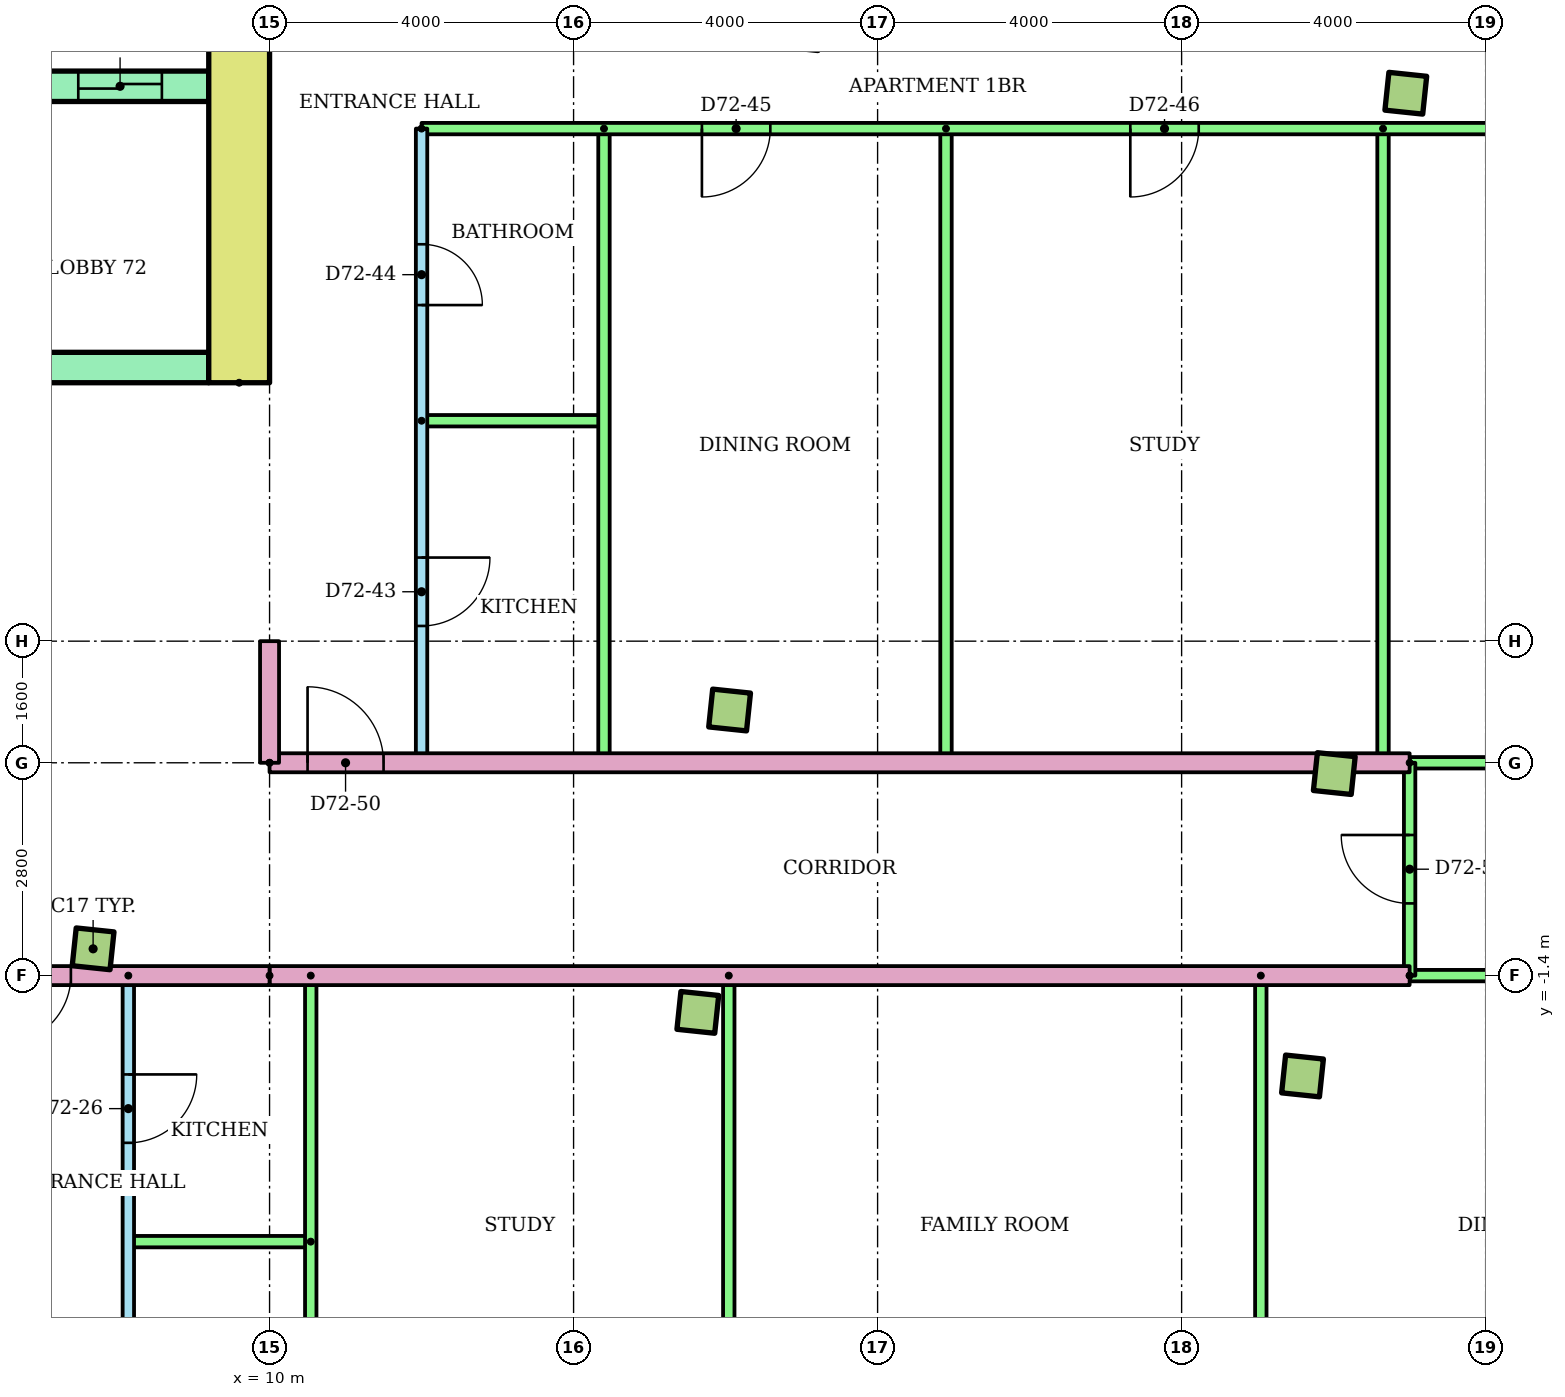
"""IFC4 building model, lengths in metres.
Left out: names, types, materials, properties, quantities, classifications, styles, units other than length and angle.
Written with IfcOpenShell. Run it as: python <this file> out.ifc"""

import sys

from ifc_helpers import new_model, si_unit, direction, frame, frame_2d, origin, origin_2d, place, context, subcontext, project, spatial, rectangle, extrude, element, fill, save


model = new_model("IFC4")
c1 = context("Model", 3, precision=1e-05, world=origin(), true_north=direction((0.0, 1.0)))
c2 = subcontext(c1, "Body", "Model", "MODEL_VIEW")
j1 = project(units=[si_unit("LENGTHUNIT", "METRE"), si_unit("PLANEANGLEUNIT", "RADIAN")], contexts=[c1])
p1 = place(None, origin())
s1 = spatial("IfcSite", under=j1, at=p1, CompositionType="ELEMENT")
p2 = place(p1, origin())
s2 = spatial("IfcBuilding", under=s1, at=p2, CompositionType="ELEMENT")
p3 = place(p2, frame((0.0, 0.0, 275.5)))
s3 = spatial("IfcBuildingStorey", under=s2, at=p3, CompositionType="ELEMENT", Elevation=275.5)
for number, where, z_axis, x_axis in (
    (1, (7.678, -1.048, 0.0), (0.0, 0.0, 1.0), (0.995, -0.105, 0.0)),
    (2, (15.635, -1.884, 0.0), (0.0, 0.0, 1.0), (0.995, -0.105, 0.0)),
    (3, (23.591, -2.72, 0.0), (0.0, 0.0, 1.0), (0.995, -0.105, 0.0)),
    (4, (16.053, 2.094, 0.0), (0.0, 0.0, 1.0), (0.995, -0.105, 0.0)),
    (5, (24.009, 1.258, 0.0), (0.0, 0.0, 1.0), (0.995, -0.105, 0.0)),
    (6, (24.95, 10.209, 0.0), (0.0, 0.0, 1.0), (0.995, -0.105, 0.0)),
):
    element("IfcColumn", number, at=place(p3, frame(where, z_axis=z_axis, x_axis=x_axis)), inside=s3, PredefinedType="COLUMN", context=c2, shape_type="SweptSolid", body=[
        extrude(rectangle(XDim=0.5, YDim=0.5, at=origin_2d()), origin(), (0.0, 0.0, 1.0), 3.2),
    ])
p4 = place(p3, frame((9.6, 6.4, 0.0), z_axis=(0.0, 0.0, 1.0), x_axis=(0.0, 1.0, 0.0)))
e7 = element("IfcWall", 7, at=p4, inside=s3, PredefinedType="SHEAR", context=c2, shape_type="SweptSolid", body=[
    extrude(rectangle(XDim=13.6, YDim=0.8, at=frame_2d((6.8, 0.0))), origin(), (0.0, 0.0, 1.0), 2.92),
])
p5 = place(p3, frame((-9.2, 6.6, 0.0)))
e8 = element("IfcWall", 8, at=p5, inside=s3, PredefinedType="SHEAR", context=c2, shape_type="SweptSolid", body=[
    extrude(rectangle(XDim=18.4, YDim=0.4, at=frame_2d((9.2, 0.0))), origin(), (0.0, 0.0, 1.0), 2.92),
])
p6 = place(p5, frame((8.3, 0.0, 0.0)))
e9 = element("IfcOpeningElement", 9, at=p6, cuts=e8, PredefinedType="OPENING", context=c2, shape_type="SweptSolid", body=[
    extrude(rectangle(XDim=1.8, YDim=2.1, at=frame_2d((0.9, 1.05))), frame((0.0, 0.21, 0.0), z_axis=(0.0, -1.0, 0.0), x_axis=(1.0, 0.0, 0.0)), (0.0, 0.0, 1.0), 0.42),
])
p7 = place(p5, frame((3.8, 0.0, 0.0)))
e10 = element("IfcOpeningElement", 10, at=p7, cuts=e8, PredefinedType="OPENING", context=c2, shape_type="SweptSolid", body=[
    extrude(rectangle(XDim=1.8, YDim=2.1, at=frame_2d((0.9, 1.05))), frame((0.0, 0.21, 0.0), z_axis=(0.0, -1.0, 0.0), x_axis=(1.0, 0.0, 0.0)), (0.0, 0.0, 1.0), 0.42),
])
p8 = place(p5, frame((12.8, 0.0, 0.0)))
e11 = element("IfcOpeningElement", 11, at=p8, cuts=e8, PredefinedType="OPENING", context=c2, shape_type="SweptSolid", body=[
    extrude(rectangle(XDim=1.8, YDim=2.1, at=frame_2d((0.9, 1.05))), frame((0.0, 0.21, 0.0), z_axis=(0.0, -1.0, 0.0), x_axis=(1.0, 0.0, 0.0)), (0.0, 0.0, 1.0), 0.42),
])
p9 = place(p3, frame((1.2, 10.3, 0.0)))
e12 = element("IfcWall", 12, at=p9, inside=s3, PredefinedType="SHEAR", context=c2, shape_type="SweptSolid", body=[
    extrude(rectangle(XDim=8.0, YDim=0.4, at=frame_2d((4.0, 0.0))), origin(), (0.0, 0.0, 1.0), 2.92),
])
p10 = place(p9, frame((0.817, 0.0, 0.0)))
e13 = element("IfcOpeningElement", 13, at=p10, cuts=e12, PredefinedType="OPENING", context=c2, shape_type="SweptSolid", body=[
    extrude(rectangle(XDim=1.1, YDim=2.1, at=frame_2d((0.55, 1.05))), frame((0.0, 0.21, 0.0), z_axis=(0.0, -1.0, 0.0), x_axis=(1.0, 0.0, 0.0)), (0.0, 0.0, 1.0), 0.42),
])
p11 = place(p9, frame((3.55, 0.0, 0.0)))
e14 = element("IfcOpeningElement", 14, at=p11, cuts=e12, PredefinedType="OPENING", context=c2, shape_type="SweptSolid", body=[
    extrude(rectangle(XDim=1.1, YDim=2.1, at=frame_2d((0.55, 1.05))), frame((0.0, 0.21, 0.0), z_axis=(0.0, -1.0, 0.0), x_axis=(1.0, 0.0, 0.0)), (0.0, 0.0, 1.0), 0.42),
])
p12 = place(p9, frame((6.283, 0.0, 0.0)))
e15 = element("IfcOpeningElement", 15, at=p12, cuts=e12, PredefinedType="OPENING", context=c2, shape_type="SweptSolid", body=[
    extrude(rectangle(XDim=1.1, YDim=2.1, at=frame_2d((0.55, 1.05))), frame((0.0, 0.21, 0.0), z_axis=(0.0, -1.0, 0.0), x_axis=(1.0, 0.0, 0.0)), (0.0, 0.0, 1.0), 0.42),
])
p13 = place(p3, frame((8.142, -1.4, 0.0), z_axis=(0.0, 0.0, 1.0), x_axis=(0.0, -1.0, 0.0)))
e16 = element("IfcWall", 16, at=p13, inside=s3, PredefinedType="PARTITIONING", context=c2, shape_type="SweptSolid", body=[
    extrude(rectangle(XDim=6.582, YDim=0.15, at=frame_2d((3.291, 0.0))), origin(), (0.0, 0.0, 1.0), 2.4),
])
p14 = place(p13, frame((1.3, 0.0, 0.0)))
e17 = element("IfcOpeningElement", 17, at=p14, cuts=e16, PredefinedType="OPENING", context=c2, shape_type="SweptSolid", body=[
    extrude(rectangle(XDim=0.9, YDim=2.1, at=frame_2d((0.45, 1.05))), frame((0.0, 0.085, 0.0), z_axis=(0.0, -1.0, 0.0), x_axis=(1.0, 0.0, 0.0)), (0.0, 0.0, 1.0), 0.17),
])
p15 = place(p13, frame((4.641, 0.0, 0.0)))
e18 = element("IfcOpeningElement", 18, at=p15, cuts=e16, PredefinedType="OPENING", context=c2, shape_type="SweptSolid", body=[
    extrude(rectangle(XDim=0.8, YDim=2.1, at=frame_2d((0.4, 1.05))), frame((0.0, 0.085, 0.0), z_axis=(0.0, -1.0, 0.0), x_axis=(1.0, 0.0, 0.0)), (0.0, 0.0, 1.0), 0.17),
])
p16 = place(p3, frame((10.542, -4.9, 0.0), z_axis=(0.0, 0.0, 1.0), x_axis=(-1.0, 0.0, 0.0)))
e19 = element("IfcWall", 19, at=p16, inside=s3, PredefinedType="PARTITIONING", context=c2, shape_type="SweptSolid", body=[
    extrude(rectangle(XDim=2.4, YDim=0.15, at=frame_2d((1.2, 0.0))), origin(), (0.0, 0.0, 1.0), 2.4),
])
for number, where, z_axis, x_axis in (
    (20, (10.542, -1.4, 0.0), (0.0, 0.0, 1.0), (0.0, -1.0, 0.0)),
    (21, (16.042, -1.4, 0.0), (0.0, 0.0, 1.0), (0.0, -1.0, 0.0)),
    (22, (23.042, -1.4, 0.0), (0.0, 0.0, 1.0), (0.0, -1.0, 0.0)),
):
    element("IfcWall", number, at=place(p3, frame(where, z_axis=z_axis, x_axis=x_axis)), inside=s3, PredefinedType="PARTITIONING", context=c2, shape_type="SweptSolid", body=[
        extrude(rectangle(XDim=6.582, YDim=0.15, at=frame_2d((3.291, 0.0))), origin(), (0.0, 0.0, 1.0), 2.4),
    ])
p17 = place(p3, frame((25.0, -1.4, 0.0), z_axis=(0.0, 0.0, 1.0), x_axis=(-1.0, 0.0, 0.0)))
e23 = element("IfcWall", 23, at=p17, inside=s3, PredefinedType="PARTITIONING", context=c2, shape_type="SweptSolid", body=[
    extrude(rectangle(XDim=15.0, YDim=0.25, at=frame_2d((7.5, 0.0))), origin(), (0.0, 0.0, 1.0), 2.4),
])
p18 = place(p3, frame((30.798, -1.4, 0.0), z_axis=(0.0, 0.0, 1.0), x_axis=(-1.0, 0.0, 0.0)))
e24 = element("IfcWall", 24, at=p18, inside=s3, PredefinedType="PARTITIONING", context=c2, shape_type="SweptSolid", body=[
    extrude(rectangle(XDim=5.798, YDim=0.15, at=frame_2d((2.899, 0.0))), origin(), (0.0, 0.0, 1.0), 2.4),
])
p19 = place(p3, frame((12.0, 9.743, 0.0), z_axis=(0.0, 0.0, 1.0), x_axis=(0.0, -1.0, 0.0)))
e25 = element("IfcWall", 25, at=p19, inside=s3, PredefinedType="PARTITIONING", context=c2, shape_type="SweptSolid", body=[
    extrude(rectangle(XDim=8.344, YDim=0.15, at=frame_2d((4.172, 0.0))), origin(), (0.0, 0.0, 1.0), 2.4),
])
p20 = place(p19, frame((5.643, 0.0, 0.0)))
e26 = element("IfcOpeningElement", 26, at=p20, cuts=e25, PredefinedType="OPENING", context=c2, shape_type="SweptSolid", body=[
    extrude(rectangle(XDim=0.9, YDim=2.1, at=frame_2d((0.45, 1.05))), frame((0.0, 0.085, 0.0), z_axis=(0.0, -1.0, 0.0), x_axis=(1.0, 0.0, 0.0)), (0.0, 0.0, 1.0), 0.17),
])
p21 = place(p19, frame((1.522, 0.0, 0.0)))
e27 = element("IfcOpeningElement", 27, at=p21, cuts=e25, PredefinedType="OPENING", context=c2, shape_type="SweptSolid", body=[
    extrude(rectangle(XDim=0.8, YDim=2.1, at=frame_2d((0.4, 1.05))), frame((0.0, 0.085, 0.0), z_axis=(0.0, -1.0, 0.0), x_axis=(1.0, 0.0, 0.0)), (0.0, 0.0, 1.0), 0.17),
])
p22 = place(p3, frame((12.0, 5.9, 0.0)))
e28 = element("IfcWall", 28, at=p22, inside=s3, PredefinedType="PARTITIONING", context=c2, shape_type="SweptSolid", body=[
    extrude(rectangle(XDim=2.4, YDim=0.15, at=frame_2d((1.2, 0.0))), origin(), (0.0, 0.0, 1.0), 2.4),
])
for number, where, z_axis, x_axis in (
    (29, (14.4, 9.743, 0.0), (0.0, 0.0, 1.0), (0.0, -1.0, 0.0)),
    (30, (18.9, 9.743, 0.0), (0.0, 0.0, 1.0), (0.0, -1.0, 0.0)),
    (31, (24.65, 9.743, 0.0), (0.0, 0.0, 1.0), (0.0, -1.0, 0.0)),
):
    element("IfcWall", number, at=place(p3, frame(where, z_axis=z_axis, x_axis=x_axis)), inside=s3, PredefinedType="PARTITIONING", context=c2, shape_type="SweptSolid", body=[
        extrude(rectangle(XDim=8.344, YDim=0.15, at=frame_2d((4.172, 0.0))), origin(), (0.0, 0.0, 1.0), 2.4),
    ])
p23 = place(p3, frame((31.96, 9.743, 0.0), z_axis=(0.0, 0.0, 1.0), x_axis=(-1.0, 0.0, 0.0)))
e32 = element("IfcWall", 32, at=p23, inside=s3, PredefinedType="PARTITIONING", context=c2, shape_type="SweptSolid", body=[
    extrude(rectangle(XDim=19.96, YDim=0.15, at=frame_2d((9.98, 0.0))), origin(), (0.0, 0.0, 1.0), 2.4),
])
p24 = place(p23, frame((15.372, 0.0, 0.0)))
e33 = element("IfcOpeningElement", 33, at=p24, cuts=e32, PredefinedType="OPENING", context=c2, shape_type="SweptSolid", body=[
    extrude(rectangle(XDim=0.9, YDim=2.1, at=frame_2d((0.45, 1.05))), frame((0.0, 0.085, 0.0), z_axis=(0.0, -1.0, 0.0), x_axis=(1.0, 0.0, 0.0)), (0.0, 0.0, 1.0), 0.17),
])
p25 = place(p23, frame((9.735, 0.0, 0.0)))
e34 = element("IfcOpeningElement", 34, at=p25, cuts=e32, PredefinedType="OPENING", context=c2, shape_type="SweptSolid", body=[
    extrude(rectangle(XDim=0.9, YDim=2.1, at=frame_2d((0.45, 1.05))), frame((0.0, 0.085, 0.0), z_axis=(0.0, -1.0, 0.0), x_axis=(1.0, 0.0, 0.0)), (0.0, 0.0, 1.0), 0.17),
])
p26 = place(p23, frame((3.157, 0.0, 0.0)))
e35 = element("IfcOpeningElement", 35, at=p26, cuts=e32, PredefinedType="OPENING", context=c2, shape_type="SweptSolid", body=[
    extrude(rectangle(XDim=0.9, YDim=2.1, at=frame_2d((0.45, 1.05))), frame((0.0, 0.085, 0.0), z_axis=(0.0, -1.0, 0.0), x_axis=(1.0, 0.0, 0.0)), (0.0, 0.0, 1.0), 0.17),
])
p27 = place(p3, frame((10.0, 1.4, 0.0)))
e36 = element("IfcWall", 36, at=p27, inside=s3, PredefinedType="PARTITIONING", context=c2, shape_type="SweptSolid", body=[
    extrude(rectangle(XDim=15.0, YDim=0.25, at=frame_2d((7.5, 0.0))), origin(), (0.0, 0.0, 1.0), 2.4),
])
p28 = place(p27, frame((0.5, 0.0, 0.0)))
e37 = element("IfcOpeningElement", 37, at=p28, cuts=e36, PredefinedType="OPENING", context=c2, shape_type="SweptSolid", body=[
    extrude(rectangle(XDim=1.0, YDim=2.1, at=frame_2d((0.5, 1.05))), frame((0.0, 0.135, 0.0), z_axis=(0.0, -1.0, 0.0), x_axis=(1.0, 0.0, 0.0)), (0.0, 0.0, 1.0), 0.27),
])
p29 = place(p3, frame((25.0, 1.4, 0.0)))
e38 = element("IfcWall", 38, at=p29, inside=s3, PredefinedType="PARTITIONING", context=c2, shape_type="SweptSolid", body=[
    extrude(rectangle(XDim=6.093, YDim=0.15, at=frame_2d((3.046, 0.0))), origin(), (0.0, 0.0, 1.0), 2.4),
])
p30 = place(p3, frame((25.0, -1.4, 0.0), z_axis=(0.0, 0.0, 1.0), x_axis=(0.0, 1.0, 0.0)))
e39 = element("IfcWall", 39, at=p30, inside=s3, PredefinedType="PARTITIONING", context=c2, shape_type="SweptSolid", body=[
    extrude(rectangle(XDim=2.8, YDim=0.15, at=frame_2d((1.4, 0.0))), origin(), (0.0, 0.0, 1.0), 2.4),
])
p31 = place(p30, frame((0.95, 0.0, 0.0)))
e40 = element("IfcOpeningElement", 40, at=p31, cuts=e39, PredefinedType="OPENING", context=c2, shape_type="SweptSolid", body=[
    extrude(rectangle(XDim=0.9, YDim=2.1, at=frame_2d((0.45, 1.05))), frame((0.0, 0.085, 0.0), z_axis=(0.0, -1.0, 0.0), x_axis=(1.0, 0.0, 0.0)), (0.0, 0.0, 1.0), 0.17),
])
p32 = place(p3, frame((10.0, -1.4, 0.0), z_axis=(0.0, 0.0, 1.0), x_axis=(-1.0, 0.0, 0.0)))
e41 = element("IfcWall", 41, at=p32, inside=s3, PredefinedType="PARTITIONING", context=c2, shape_type="SweptSolid", body=[
    extrude(rectangle(XDim=20.0, YDim=0.25, at=frame_2d((10.0, 0.0))), origin(), (0.0, 0.0, 1.0), 2.4),
])
p33 = place(p32, frame((4.358, 0.0, 0.0)))
e42 = element("IfcOpeningElement", 42, at=p33, cuts=e41, PredefinedType="OPENING", context=c2, shape_type="SweptSolid", body=[
    extrude(rectangle(XDim=1.0, YDim=2.1, at=frame_2d((0.5, 1.05))), frame((0.0, 0.135, 0.0), z_axis=(0.0, -1.0, 0.0), x_axis=(1.0, 0.0, 0.0)), (0.0, 0.0, 1.0), 0.27),
])
p34 = place(p32, frame((2.614, 0.0, 0.0)))
e43 = element("IfcOpeningElement", 43, at=p34, cuts=e41, PredefinedType="OPENING", context=c2, shape_type="SweptSolid", body=[
    extrude(rectangle(XDim=0.9, YDim=2.1, at=frame_2d((0.45, 1.05))), frame((0.0, 0.135, 0.0), z_axis=(0.0, -1.0, 0.0), x_axis=(1.0, 0.0, 0.0)), (0.0, 0.0, 1.0), 0.27),
])
p35 = place(p3, frame((10.0, 1.4, 0.0), z_axis=(0.0, 0.0, 1.0), x_axis=(0.0, 1.0, 0.0)))
e44 = element("IfcWall", 44, at=p35, inside=s3, PredefinedType="PARTITIONING", context=c2, shape_type="SweptSolid", body=[
    extrude(rectangle(XDim=1.6, YDim=0.25, at=frame_2d((0.8, 0.0))), origin(), (0.0, 0.0, 1.0), 2.4),
])
p36 = place(p12, origin())
e45 = element("IfcDoor", 45, at=p36, inside=s3, OperationType="SLIDING_TO_LEFT", PredefinedType="DOOR", context=c2, shape_type="SweptSolid", body=[
    extrude(rectangle(XDim=1.1, YDim=2.1, at=frame_2d((0.55, 1.05))), frame((0.0, 0.025, 0.0), z_axis=(0.0, -1.0, 0.0), x_axis=(1.0, 0.0, 0.0)), (0.0, 0.0, 1.0), 0.05),
])
fill(e15, e45)
p37 = place(p14, origin())
e46 = element("IfcDoor", 46, at=p37, inside=s3, OperationType="SINGLE_SWING_LEFT", PredefinedType="DOOR", context=c2, shape_type="SweptSolid", body=[
    extrude(rectangle(XDim=0.9, YDim=2.1, at=frame_2d((0.45, 1.05))), frame((0.0, 0.025, 0.0), z_axis=(0.0, -1.0, 0.0), x_axis=(1.0, 0.0, 0.0)), (0.0, 0.0, 1.0), 0.05),
])
fill(e17, e46)
p38 = place(p34, origin())
e47 = element("IfcDoor", 47, at=p38, inside=s3, OperationType="SINGLE_SWING_RIGHT", PredefinedType="DOOR", context=c2, shape_type="SweptSolid", body=[
    extrude(rectangle(XDim=0.9, YDim=2.1, at=frame_2d((0.45, 1.05))), frame((0.0, 0.025, 0.0), z_axis=(0.0, -1.0, 0.0), x_axis=(1.0, 0.0, 0.0)), (0.0, 0.0, 1.0), 0.05),
])
fill(e43, e47)
p39 = place(p20, origin())
e48 = element("IfcDoor", 48, at=p39, inside=s3, OperationType="SINGLE_SWING_LEFT", PredefinedType="DOOR", context=c2, shape_type="SweptSolid", body=[
    extrude(rectangle(XDim=0.9, YDim=2.1, at=frame_2d((0.45, 1.05))), frame((0.0, 0.025, 0.0), z_axis=(0.0, -1.0, 0.0), x_axis=(1.0, 0.0, 0.0)), (0.0, 0.0, 1.0), 0.05),
])
fill(e26, e48)
p40 = place(p21, origin())
e49 = element("IfcDoor", 49, at=p40, inside=s3, OperationType="SINGLE_SWING_RIGHT", PredefinedType="DOOR", context=c2, shape_type="SweptSolid", body=[
    extrude(rectangle(XDim=0.8, YDim=2.1, at=frame_2d((0.4, 1.05))), frame((0.0, 0.025, 0.0), z_axis=(0.0, -1.0, 0.0), x_axis=(1.0, 0.0, 0.0)), (0.0, 0.0, 1.0), 0.05),
])
fill(e27, e49)
p41 = place(p24, origin())
e50 = element("IfcDoor", 50, at=p41, inside=s3, OperationType="SINGLE_SWING_RIGHT", PredefinedType="DOOR", context=c2, shape_type="SweptSolid", body=[
    extrude(rectangle(XDim=0.9, YDim=2.1, at=frame_2d((0.45, 1.05))), frame((0.0, 0.025, 0.0), z_axis=(0.0, -1.0, 0.0), x_axis=(1.0, 0.0, 0.0)), (0.0, 0.0, 1.0), 0.05),
])
fill(e33, e50)
p42 = place(p25, origin())
e51 = element("IfcDoor", 51, at=p42, inside=s3, OperationType="SINGLE_SWING_RIGHT", PredefinedType="DOOR", context=c2, shape_type="SweptSolid", body=[
    extrude(rectangle(XDim=0.9, YDim=2.1, at=frame_2d((0.45, 1.05))), frame((0.0, 0.025, 0.0), z_axis=(0.0, -1.0, 0.0), x_axis=(1.0, 0.0, 0.0)), (0.0, 0.0, 1.0), 0.05),
])
fill(e34, e51)
p43 = place(p28, origin())
e52 = element("IfcDoor", 52, at=p43, inside=s3, OperationType="SINGLE_SWING_LEFT", PredefinedType="DOOR", context=c2, shape_type="SweptSolid", body=[
    extrude(rectangle(XDim=1.0, YDim=2.1, at=frame_2d((0.5, 1.05))), frame((0.0, 0.025, 0.0), z_axis=(0.0, -1.0, 0.0), x_axis=(1.0, 0.0, 0.0)), (0.0, 0.0, 1.0), 0.05),
])
fill(e37, e52)
p44 = place(p31, origin())
e53 = element("IfcDoor", 53, at=p44, inside=s3, OperationType="SINGLE_SWING_RIGHT", PredefinedType="DOOR", context=c2, shape_type="SweptSolid", body=[
    extrude(rectangle(XDim=0.9, YDim=2.1, at=frame_2d((0.45, 1.05))), frame((0.0, 0.025, 0.0), z_axis=(0.0, -1.0, 0.0), x_axis=(1.0, 0.0, 0.0)), (0.0, 0.0, 1.0), 0.05),
])
fill(e40, e53)
save(model, sys.argv[1])
